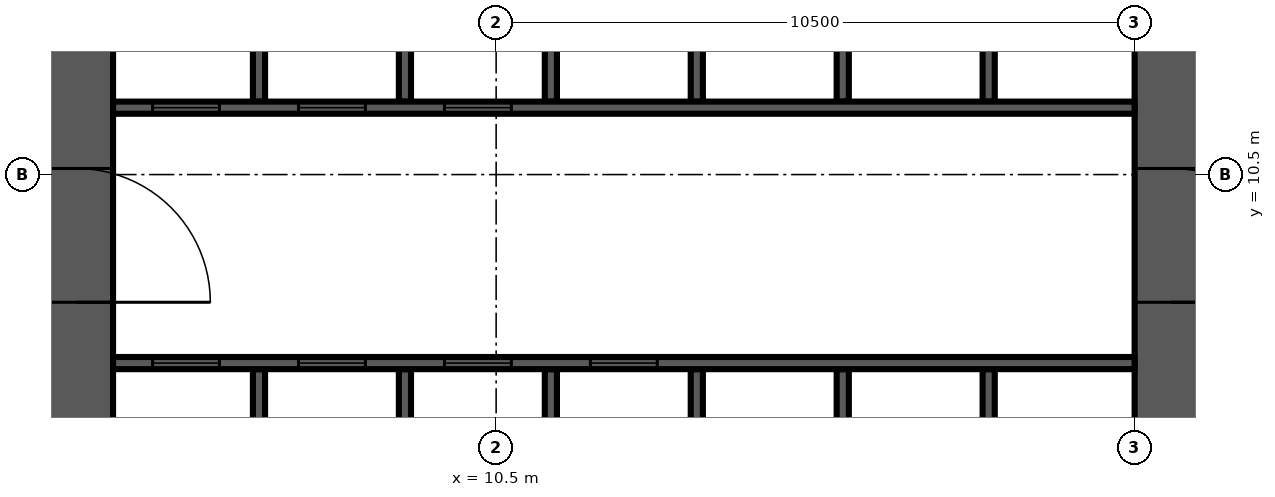
"""IFC4 building model, lengths in metres.
Left out: names, types, materials, properties, quantities, classifications, styles, units other than length and angle.
Written with IfcOpenShell. Run it as: python <this file> out.ifc"""

import sys

from ifc_helpers import new_model, si_unit, direction, frame, frame_2d, origin, place, context, subcontext, project, spatial, rectangle, extrude, source, transform, mapped, element, fill, save


model = new_model("IFC4")
c1 = context("Model", 3, precision=1e-05, world=origin(), true_north=direction((0.0, 1.0)))
c2 = subcontext(c1, "Body", "Model", "MODEL_VIEW")
j1 = project(units=[si_unit("LENGTHUNIT", "METRE"), si_unit("PLANEANGLEUNIT", "RADIAN")], contexts=[c1])
p1 = place(None, origin())
s1 = spatial("IfcSite", under=j1, at=p1, CompositionType="ELEMENT")
p2 = place(p1, origin())
s2 = spatial("IfcBuilding", under=s1, at=p2, CompositionType="ELEMENT")
p3 = place(p2, frame((0.0, 0.0, 40.5)))
s3 = spatial("IfcBuildingStorey", under=s2, at=p3, CompositionType="ELEMENT", Elevation=40.5)
p4 = place(p3, frame((3.6, 4.2, 0.0), z_axis=(0.0, 0.0, 1.0), x_axis=(0.0, 1.0, 0.0)))
e1 = element("IfcWall", 1, at=p4, inside=s3, PredefinedType="SHEAR", context=c2, shape_type="SweptSolid", body=[
    extrude(rectangle(XDim=18.0, YDim=1.2, at=frame_2d((9.0, 0.0))), origin(), (0.0, 0.0, 1.0), 4.2),
])
m1 = source(origin(), c2, "Body", "SweptSolid", [
    extrude(rectangle(XDim=2.2, YDim=2.1, at=frame_2d((1.1, 1.05))), frame((0.0, 0.61, 0.0), z_axis=(0.0, -1.0, 0.0), x_axis=(1.0, 0.0, 0.0)), (0.0, 0.0, 1.0), 1.22),
])
p5 = place(p4, frame((4.2, 0.0, 0.0)))
e2 = element("IfcOpeningElement", 2, at=p5, cuts=e1, PredefinedType="OPENING", context=c2, shape_type="MappedRepresentation", body=[
    mapped(m1, transform((0.0, 0.0, 0.0), scale=1.0)),
])
p6 = place(p3, frame((21.6, 4.2, 0.0), z_axis=(0.0, 0.0, 1.0), x_axis=(0.0, 1.0, 0.0)))
e3 = element("IfcWall", 3, at=p6, inside=s3, PredefinedType="SHEAR", context=c2, shape_type="SweptSolid", body=[
    extrude(rectangle(XDim=16.8, YDim=1.2, at=frame_2d((8.4, 0.0))), origin(), (0.0, 0.0, 1.0), 4.2),
])
p7 = place(p6, frame((4.2, 0.0, 0.0)))
e4 = element("IfcOpeningElement", 4, at=p7, cuts=e3, PredefinedType="OPENING", context=c2, shape_type="MappedRepresentation", body=[
    mapped(m1, transform((0.0, 0.0, 0.0), scale=1.0)),
])
m2 = source(origin(), c2, "Body", "SweptSolid", [
    extrude(rectangle(XDim=1.2, YDim=2.1, at=frame_2d((0.6, 1.05))), frame((0.0, 0.61, 0.0), z_axis=(0.0, -1.0, 0.0), x_axis=(1.0, 0.0, 0.0)), (0.0, 0.0, 1.0), 1.22),
])
p8 = place(p6, frame((14.7, 0.0, 0.0)))
e5 = element("IfcOpeningElement", 5, at=p8, cuts=e3, PredefinedType="OPENING", context=c2, shape_type="MappedRepresentation", body=[
    mapped(m2, transform((0.0, 0.0, 0.0), scale=1.0)),
])
p9 = place(p3, frame((6.6, 4.2, 0.0), z_axis=(0.0, 0.0, 1.0), x_axis=(0.0, 1.0, 0.0)))
e6 = element("IfcWall", 6, at=p9, inside=s3, PredefinedType="SOLIDWALL", context=c2, shape_type="SweptSolid", body=[
    extrude(rectangle(XDim=3.1, YDim=0.2, at=frame_2d((1.55, 0.0))), origin(), (0.0, 0.0, 1.0), 4.2),
])
m3 = source(origin(), c2, "Body", "SweptSolid", [
    extrude(rectangle(XDim=3.1, YDim=0.2, at=frame_2d((1.55, 0.0))), origin(), (0.0, 0.0, 1.0), 4.2),
])
for number, where, z_axis, x_axis in (
    (7, (9.0, 4.2, 0.0), (0.0, 0.0, 1.0), (0.0, 1.0, 0.0)),
    (8, (11.4, 4.2, 0.0), (0.0, 0.0, 1.0), (0.0, 1.0, 0.0)),
    (9, (13.8, 4.2, 0.0), (0.0, 0.0, 1.0), (0.0, 1.0, 0.0)),
    (10, (16.2, 4.2, 0.0), (0.0, 0.0, 1.0), (0.0, 1.0, 0.0)),
    (11, (18.6, 4.2, 0.0), (0.0, 0.0, 1.0), (0.0, 1.0, 0.0)),
):
    element("IfcWall", number, at=place(p3, frame(where, z_axis=z_axis, x_axis=x_axis)), inside=s3, PredefinedType="SOLIDWALL", context=c2, shape_type="MappedRepresentation", body=[
        mapped(m3, transform((0.0, 0.0, 0.0), scale=1.0)),
    ])
p10 = place(p3, frame((6.6, 11.7, 0.0), z_axis=(0.0, 0.0, 1.0), x_axis=(0.0, 1.0, 0.0)))
e12 = element("IfcWall", 12, at=p10, inside=s3, PredefinedType="SOLIDWALL", context=c2, shape_type="SweptSolid", body=[
    extrude(rectangle(XDim=3.0, YDim=0.2, at=frame_2d((1.5, 0.0))), origin(), (0.0, 0.0, 1.0), 4.2),
])
m4 = source(origin(), c2, "Body", "SweptSolid", [
    extrude(rectangle(XDim=3.0, YDim=0.2, at=frame_2d((1.5, 0.0))), origin(), (0.0, 0.0, 1.0), 4.2),
])
for number, where, z_axis, x_axis in (
    (13, (9.0, 11.7, 0.0), (0.0, 0.0, 1.0), (0.0, 1.0, 0.0)),
    (14, (11.4, 11.7, 0.0), (0.0, 0.0, 1.0), (0.0, 1.0, 0.0)),
    (15, (13.8, 11.7, 0.0), (0.0, 0.0, 1.0), (0.0, 1.0, 0.0)),
    (16, (16.2, 11.7, 0.0), (0.0, 0.0, 1.0), (0.0, 1.0, 0.0)),
    (17, (18.6, 11.7, 0.0), (0.0, 0.0, 1.0), (0.0, 1.0, 0.0)),
):
    element("IfcWall", number, at=place(p3, frame(where, z_axis=z_axis, x_axis=x_axis)), inside=s3, PredefinedType="SOLIDWALL", context=c2, shape_type="MappedRepresentation", body=[
        mapped(m4, transform((0.0, 0.0, 0.0), scale=1.0)),
    ])
p11 = place(p3, frame((4.2, 7.4, 0.0), z_axis=(0.0, 0.0, 1.0), x_axis=(1.0, 0.0, 0.0)))
e18 = element("IfcWall", 18, at=p11, inside=s3, PredefinedType="SOLIDWALL", context=c2, shape_type="SweptSolid", body=[
    extrude(rectangle(XDim=16.8, YDim=0.2, at=frame_2d((8.4, 0.0))), origin(), (0.0, 0.0, 1.0), 4.2),
])
m5 = source(origin(), c2, "Body", "SweptSolid", [
    extrude(rectangle(XDim=1.1, YDim=2.1, at=frame_2d((0.55, 1.05))), frame((0.0, 0.11, 0.0), z_axis=(0.0, -1.0, 0.0), x_axis=(1.0, 0.0, 0.0)), (0.0, 0.0, 1.0), 0.22),
])
p12 = place(p11, frame((0.65, 0.0, 0.0)))
e19 = element("IfcOpeningElement", 19, at=p12, cuts=e18, PredefinedType="OPENING", context=c2, shape_type="MappedRepresentation", body=[
    mapped(m5, transform((0.0, 0.0, 0.0), scale=1.0)),
])
p13 = place(p11, frame((3.05, 0.0, 0.0)))
e20 = element("IfcOpeningElement", 20, at=p13, cuts=e18, PredefinedType="OPENING", context=c2, shape_type="MappedRepresentation", body=[
    mapped(m5, transform((0.0, 0.0, 0.0), scale=1.0)),
])
p14 = place(p11, frame((5.45, 0.0, 0.0)))
e21 = element("IfcOpeningElement", 21, at=p14, cuts=e18, PredefinedType="OPENING", context=c2, shape_type="MappedRepresentation", body=[
    mapped(m5, transform((0.0, 0.0, 0.0), scale=1.0)),
])
p15 = place(p11, frame((7.85, 0.0, 0.0)))
e22 = element("IfcOpeningElement", 22, at=p15, cuts=e18, PredefinedType="OPENING", context=c2, shape_type="MappedRepresentation", body=[
    mapped(m5, transform((0.0, 0.0, 0.0), scale=1.0)),
])
m6 = source(origin(), c2, "Body", "SweptSolid", [
    extrude(rectangle(XDim=16.8, YDim=0.2, at=frame_2d((8.4, 0.0))), origin(), (0.0, 0.0, 1.0), 4.2),
])
p16 = place(p3, frame((4.2, 11.6, 0.0), z_axis=(0.0, 0.0, 1.0), x_axis=(1.0, 0.0, 0.0)))
e23 = element("IfcWall", 23, at=p16, inside=s3, PredefinedType="SOLIDWALL", context=c2, shape_type="MappedRepresentation", body=[
    mapped(m6, transform((0.0, 0.0, 0.0), scale=1.0)),
])
p17 = place(p16, frame((0.65, 0.0, 0.0)))
e24 = element("IfcOpeningElement", 24, at=p17, cuts=e23, PredefinedType="OPENING", context=c2, shape_type="MappedRepresentation", body=[
    mapped(m5, transform((0.0, 0.0, 0.0), scale=1.0)),
])
p18 = place(p16, frame((3.05, 0.0, 0.0)))
e25 = element("IfcOpeningElement", 25, at=p18, cuts=e23, PredefinedType="OPENING", context=c2, shape_type="MappedRepresentation", body=[
    mapped(m5, transform((0.0, 0.0, 0.0), scale=1.0)),
])
p19 = place(p16, frame((5.45, 0.0, 0.0)))
e26 = element("IfcOpeningElement", 26, at=p19, cuts=e23, PredefinedType="OPENING", context=c2, shape_type="MappedRepresentation", body=[
    mapped(m5, transform((0.0, 0.0, 0.0), scale=1.0)),
])
m7 = source(origin(), c2, "Body", "SweptSolid", [
    extrude(rectangle(XDim=1.1, YDim=2.1, at=frame_2d((0.55, 1.05))), frame((0.0, 0.025, 0.0), z_axis=(0.0, -1.0, 0.0), x_axis=(1.0, 0.0, 0.0)), (0.0, 0.0, 1.0), 0.05),
])
p20 = place(p12, origin())
e27 = element("IfcDoor", 27, at=p20, inside=s3, OperationType="SLIDING_TO_LEFT", PredefinedType="DOOR", context=c2, shape_type="MappedRepresentation", body=[
    mapped(m7, transform((0.0, 0.0, 0.0), scale=1.0)),
])
fill(e19, e27)
p21 = place(p13, origin())
e28 = element("IfcDoor", 28, at=p21, inside=s3, OperationType="SLIDING_TO_LEFT", PredefinedType="DOOR", context=c2, shape_type="MappedRepresentation", body=[
    mapped(m7, transform((0.0, 0.0, 0.0), scale=1.0)),
])
fill(e20, e28)
p22 = place(p14, origin())
e29 = element("IfcDoor", 29, at=p22, inside=s3, OperationType="SLIDING_TO_LEFT", PredefinedType="DOOR", context=c2, shape_type="MappedRepresentation", body=[
    mapped(m7, transform((0.0, 0.0, 0.0), scale=1.0)),
])
fill(e21, e29)
p23 = place(p15, origin())
e30 = element("IfcDoor", 30, at=p23, inside=s3, OperationType="SLIDING_TO_LEFT", PredefinedType="DOOR", context=c2, shape_type="MappedRepresentation", body=[
    mapped(m7, transform((0.0, 0.0, 0.0), scale=1.0)),
])
fill(e22, e30)
p24 = place(p17, origin())
e31 = element("IfcDoor", 31, at=p24, inside=s3, OperationType="SLIDING_TO_LEFT", PredefinedType="DOOR", context=c2, shape_type="MappedRepresentation", body=[
    mapped(m7, transform((0.0, 0.0, 0.0), scale=1.0)),
])
fill(e24, e31)
p25 = place(p18, origin())
e32 = element("IfcDoor", 32, at=p25, inside=s3, OperationType="SLIDING_TO_LEFT", PredefinedType="DOOR", context=c2, shape_type="MappedRepresentation", body=[
    mapped(m7, transform((0.0, 0.0, 0.0), scale=1.0)),
])
fill(e25, e32)
p26 = place(p19, origin())
e33 = element("IfcDoor", 33, at=p26, inside=s3, OperationType="SLIDING_TO_LEFT", PredefinedType="DOOR", context=c2, shape_type="MappedRepresentation", body=[
    mapped(m7, transform((0.0, 0.0, 0.0), scale=1.0)),
])
fill(e26, e33)
m8 = source(origin(), c2, "Body", "SweptSolid", [
    extrude(rectangle(XDim=2.2, YDim=2.1, at=frame_2d((1.1, 1.05))), frame((0.0, 0.025, 0.0), z_axis=(0.0, -1.0, 0.0), x_axis=(1.0, 0.0, 0.0)), (0.0, 0.0, 1.0), 0.05),
])
p27 = place(p7, origin())
e34 = element("IfcDoor", 34, at=p27, inside=s3, OperationType="DOUBLE_DOOR_SINGLE_SWING", PredefinedType="DOOR", context=c2, shape_type="MappedRepresentation", body=[
    mapped(m8, transform((0.0, 0.0, 0.0), scale=1.0)),
])
fill(e4, e34)
p28 = place(p5, origin())
e35 = element("IfcDoor", 35, at=p28, inside=s3, OperationType="DOUBLE_DOOR_SINGLE_SWING", PredefinedType="DOOR", context=c2, shape_type="MappedRepresentation", body=[
    mapped(m8, transform((0.0, 0.0, 0.0), scale=1.0)),
])
fill(e2, e35)
save(model, sys.argv[1])
